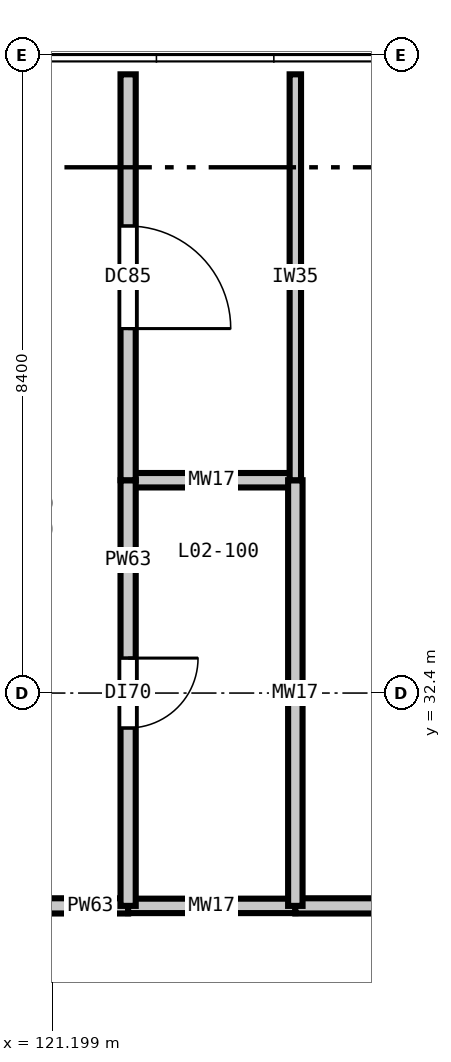
"""IFC4 building model, lengths in metres.
Left out: names, types, materials, properties, quantities, classifications, styles, units other than length and angle.
Written with IfcOpenShell. Run it as: python <this file> out.ifc"""

import sys

from ifc_helpers import new_model, si_unit, direction, frame, frame_2d, origin, place, context, subcontext, project, spatial, rectangle, extrude, element, fill, save


model = new_model("IFC4")
c1 = context("Model", 3, precision=1e-05, world=origin(), true_north=direction((0.0, 1.0)))
c2 = subcontext(c1, "Body", "Model", "MODEL_VIEW")
j1 = project(units=[si_unit("LENGTHUNIT", "METRE"), si_unit("PLANEANGLEUNIT", "RADIAN")], contexts=[c1])
p1 = place(None, origin())
s1 = spatial("IfcSite", under=j1, at=p1, CompositionType="ELEMENT")
p2 = place(p1, origin())
s2 = spatial("IfcBuilding", under=s1, at=p2, CompositionType="ELEMENT")
p3 = place(p2, frame((0.0, 0.0, 10.8)))
s3 = spatial("IfcBuildingStorey", under=s2, at=p3, CompositionType="ELEMENT", Elevation=10.8)
p4 = place(p3, frame((117.86, 29.6, 0.0), z_axis=(0.0, 0.0, 1.0), x_axis=(1.0, 0.0, 0.0)))
e1 = element("IfcWall", 1, at=p4, inside=s3, PredefinedType="PARTITIONING", context=c2, shape_type="SweptSolid", body=[
    extrude(rectangle(XDim=4.34, YDim=0.2, at=frame_2d((2.17, 0.0))), origin(), (0.0, 0.0, 1.0), 5.07),
])
p5 = place(p4, frame((1.245, 0.0, 0.0)))
e2 = element("IfcOpeningElement", 2, at=p5, cuts=e1, PredefinedType="OPENING", context=c2, shape_type="SweptSolid", body=[
    extrude(rectangle(XDim=1.85, YDim=2.3, at=frame_2d((0.925, 1.15))), frame((0.0, 0.11, 0.0), z_axis=(0.0, -1.0, 0.0), x_axis=(1.0, 0.0, 0.0)), (0.0, 0.0, 1.0), 0.22),
])
p6 = place(p3, frame((122.2, 29.6, 0.0), z_axis=(0.0, 0.0, 1.0), x_axis=(1.0, 0.0, 0.0)))
e3 = element("IfcWall", 3, at=p6, inside=s3, PredefinedType="PLUMBINGWALL", context=c2, shape_type="SweptSolid", body=[
    extrude(rectangle(XDim=2.2, YDim=0.19, at=frame_2d((1.1, 0.0))), origin(), (0.0, 0.0, 1.0), 5.07),
])
p7 = place(p3, frame((124.4, 29.6, 0.0), z_axis=(0.0, 0.0, 1.0), x_axis=(1.0, 0.0, 0.0)))
e4 = element("IfcWall", 4, at=p7, inside=s3, PredefinedType="PARTITIONING", context=c2, shape_type="SweptSolid", body=[
    extrude(rectangle(XDim=7.2, YDim=0.2, at=frame_2d((3.6, 0.0))), origin(), (0.0, 0.0, 1.0), 5.07),
])
p8 = place(p7, frame((2.975, 0.0, 0.0)))
e5 = element("IfcOpeningElement", 5, at=p8, cuts=e4, PredefinedType="OPENING", context=c2, shape_type="SweptSolid", body=[
    extrude(rectangle(XDim=1.25, YDim=2.15, at=frame_2d((0.625, 1.075))), frame((0.0, 0.11, 0.0), z_axis=(0.0, -1.0, 0.0), x_axis=(1.0, 0.0, 0.0)), (0.0, 0.0, 1.0), 0.22),
])
p9 = place(p3, frame((122.2, 35.2, 0.0), z_axis=(0.0, 0.0, 1.0), x_axis=(1.0, 0.0, 0.0)))
e6 = element("IfcWall", 6, at=p9, inside=s3, PredefinedType="PLUMBINGWALL", context=c2, shape_type="SweptSolid", body=[
    extrude(rectangle(XDim=2.2, YDim=0.19, at=frame_2d((1.1, 0.0))), origin(), (0.0, 0.0, 1.0), 5.07),
])
p10 = place(p3, frame((122.2, 29.6, 0.0), z_axis=(0.0, 0.0, 1.0), x_axis=(0.0, 1.0, 0.0)))
e7 = element("IfcWall", 7, at=p10, inside=s3, PredefinedType="PARTITIONING", context=c2, shape_type="SweptSolid", body=[
    extrude(rectangle(XDim=5.6, YDim=0.2, at=frame_2d((2.8, 0.0))), origin(), (0.0, 0.0, 1.0), 5.07),
])
p11 = place(p10, frame((2.34, 0.0, 0.0)))
e8 = element("IfcOpeningElement", 8, at=p11, cuts=e7, PredefinedType="OPENING", context=c2, shape_type="SweptSolid", body=[
    extrude(rectangle(XDim=0.92, YDim=2.1, at=frame_2d((0.46, 1.05))), frame((0.0, 0.11, 0.0), z_axis=(0.0, -1.0, 0.0), x_axis=(1.0, 0.0, 0.0)), (0.0, 0.0, 1.0), 0.22),
])
p12 = place(p3, frame((122.2, 35.2, 0.0), z_axis=(0.0, 0.0, 1.0), x_axis=(0.0, 1.0, 0.0)))
e9 = element("IfcWall", 9, at=p12, inside=s3, PredefinedType="PARTITIONING", context=c2, shape_type="SweptSolid", body=[
    extrude(rectangle(XDim=5.34, YDim=0.2, at=frame_2d((2.67, 0.0))), origin(), (0.0, 0.0, 1.0), 5.07),
])
p13 = place(p12, frame((1.995, 0.0, 0.0)))
e10 = element("IfcOpeningElement", 10, at=p13, cuts=e9, PredefinedType="OPENING", context=c2, shape_type="SweptSolid", body=[
    extrude(rectangle(XDim=1.35, YDim=2.2, at=frame_2d((0.675, 1.1))), frame((0.0, 0.11, 0.0), z_axis=(0.0, -1.0, 0.0), x_axis=(1.0, 0.0, 0.0)), (0.0, 0.0, 1.0), 0.22),
])
p14 = place(p3, frame((124.4, 29.6, 0.0), z_axis=(0.0, 0.0, 1.0), x_axis=(0.0, 1.0, 0.0)))
e11 = element("IfcWall", 11, at=p14, inside=s3, PredefinedType="PLUMBINGWALL", context=c2, shape_type="SweptSolid", body=[
    extrude(rectangle(XDim=5.6, YDim=0.19, at=frame_2d((2.8, 0.0))), origin(), (0.0, 0.0, 1.0), 5.07),
])
p15 = place(p3, frame((124.4, 35.2, 0.0), z_axis=(0.0, 0.0, 1.0), x_axis=(0.0, 1.0, 0.0)))
e12 = element("IfcWall", 12, at=p15, inside=s3, PredefinedType="PARTITIONING", context=c2, shape_type="SweptSolid", body=[
    extrude(rectangle(XDim=5.34, YDim=0.15, at=frame_2d((2.67, 0.0))), origin(), (0.0, 0.0, 1.0), 5.07),
])
p16 = place(p11, frame((0.92, 0.0, 0.0), z_axis=(0.0, 0.0, 1.0), x_axis=(-1.0, 0.0, 0.0)))
e13 = element("IfcDoor", 13, at=p16, inside=s3, OperationType="SINGLE_SWING_LEFT", PredefinedType="DOOR", context=c2, shape_type="SweptSolid", body=[
    extrude(rectangle(XDim=0.92, YDim=2.1, at=frame_2d((0.46, 1.05))), frame((0.0, 0.025, 0.0), z_axis=(0.0, -1.0, 0.0), x_axis=(1.0, 0.0, 0.0)), (0.0, 0.0, 1.0), 0.05),
])
fill(e8, e13)
p17 = place(p13, frame((1.35, 0.0, 0.0), z_axis=(0.0, 0.0, 1.0), x_axis=(-1.0, 0.0, 0.0)))
e14 = element("IfcDoor", 14, at=p17, inside=s3, OperationType="SINGLE_SWING_RIGHT", PredefinedType="DOOR", context=c2, shape_type="SweptSolid", body=[
    extrude(rectangle(XDim=1.35, YDim=2.2, at=frame_2d((0.675, 1.1))), frame((0.0, 0.025, 0.0), z_axis=(0.0, -1.0, 0.0), x_axis=(1.0, 0.0, 0.0)), (0.0, 0.0, 1.0), 0.05),
])
fill(e10, e14)
save(model, sys.argv[1])
